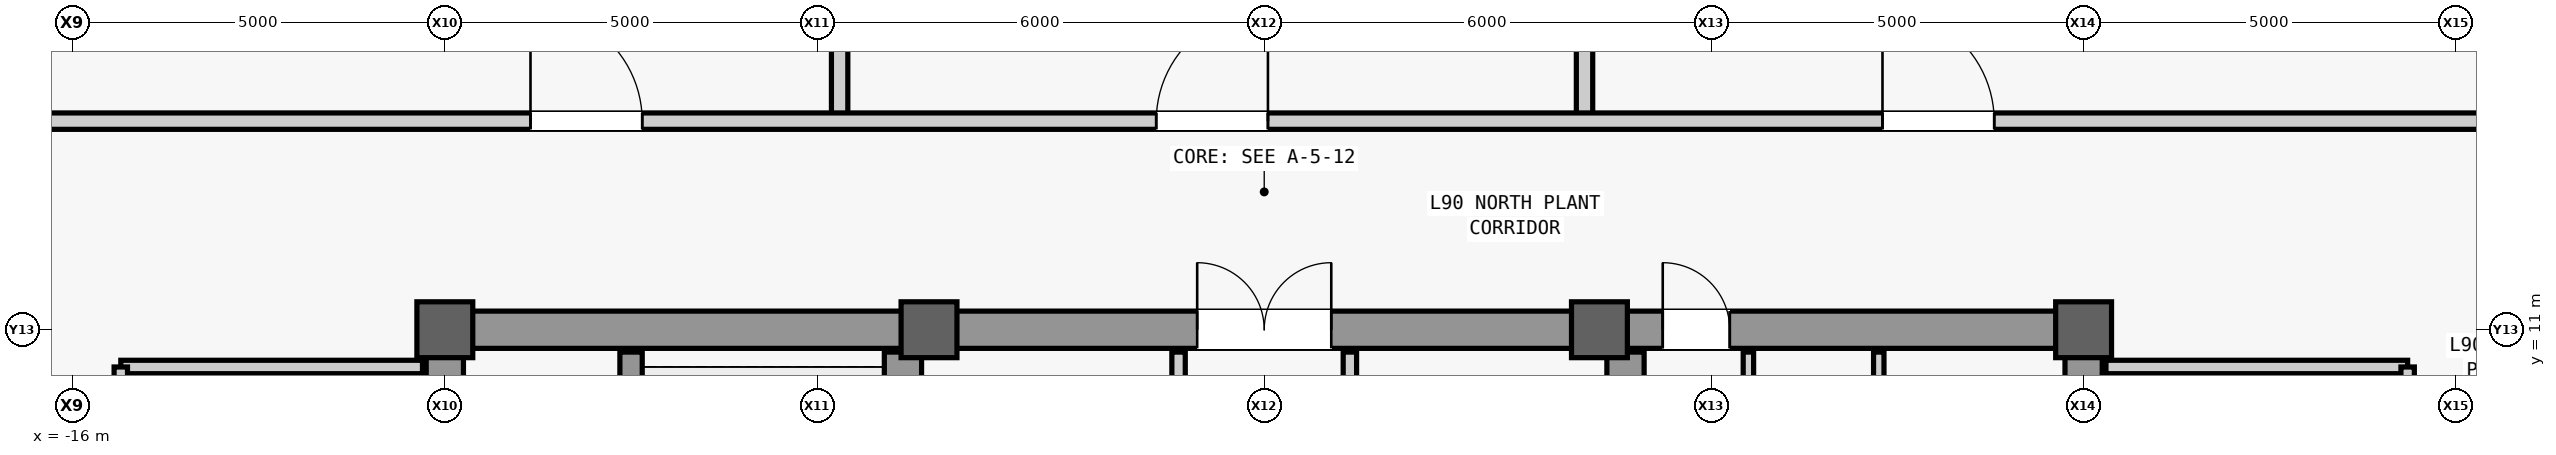
"""IFC4 building model, lengths in metres.
Left out: names, types, materials, properties, quantities, classifications, styles, units other than length and angle.
Written with IfcOpenShell. Run it as: python <this file> out.ifc"""

import sys

from ifc_helpers import new_model, si_unit, direction, frame, frame_2d, origin, origin_2d, place, context, subcontext, project, spatial, rectangle, extrude, source, transform, mapped, element, fill, save


model = new_model("IFC4")
c1 = context("Model", 3, precision=1e-05, world=origin(), true_north=direction((0.0, 1.0)))
c2 = subcontext(c1, "Body", "Model", "MODEL_VIEW")
j1 = project(units=[si_unit("LENGTHUNIT", "METRE"), si_unit("PLANEANGLEUNIT", "RADIAN")], contexts=[c1])
p1 = place(None, origin())
s1 = spatial("IfcSite", under=j1, at=p1, CompositionType="ELEMENT")
p2 = place(p1, origin())
s2 = spatial("IfcBuilding", under=s1, at=p2, CompositionType="ELEMENT")
p3 = place(p2, frame((0.0, 0.0, 380.3)))
s3 = spatial("IfcBuildingStorey", under=s2, at=p3, CompositionType="ELEMENT", Elevation=380.3)
m1 = source(origin(), c2, "Body", "SweptSolid", [
    extrude(rectangle(XDim=22.0, YDim=0.5, at=frame_2d((11.0, 0.0))), origin(), (0.0, 0.0, 1.0), 4.45),
])
p4 = place(p3, frame((-11.0, -11.0, 0.0), z_axis=(0.0, 0.0, 1.0), x_axis=(0.0, 1.0, 0.0)))
e1 = element("IfcWall", 1, at=p4, inside=s3, PredefinedType="SHEAR", context=c2, shape_type="MappedRepresentation", body=[
    mapped(m1, transform((0.0, 0.0, 0.0), scale=1.0)),
])
m2 = source(origin(), c2, "Body", "SweptSolid", [
    extrude(rectangle(XDim=1.1, YDim=2.2, at=frame_2d((0.55, 1.1))), frame((0.0, 0.26, 0.0), z_axis=(0.0, -1.0, 0.0), x_axis=(1.0, 0.0, 0.0)), (0.0, 0.0, 1.0), 0.52),
])
p5 = place(p4, frame((0.8, 0.0, 0.0)))
e2 = element("IfcOpeningElement", 2, at=p5, cuts=e1, PredefinedType="OPENING", context=c2, shape_type="MappedRepresentation", body=[
    mapped(m2, transform((0.0, 0.0, 0.0), scale=1.0)),
])
p6 = place(p4, frame((12.5, 0.0, 0.0)))
e3 = element("IfcOpeningElement", 3, at=p6, cuts=e1, PredefinedType="OPENING", context=c2, shape_type="MappedRepresentation", body=[
    mapped(m2, transform((0.0, 0.0, 0.0), scale=1.0)),
])
m3 = source(origin(), c2, "Body", "SweptSolid", [
    extrude(rectangle(XDim=0.9, YDim=2.15, at=frame_2d((0.45, 1.075))), frame((0.0, 0.26, 0.0), z_axis=(0.0, -1.0, 0.0), x_axis=(1.0, 0.0, 0.0)), (0.0, 0.0, 1.0), 0.52),
])
p7 = place(p4, frame((7.575, 0.0, 0.0)))
e4 = element("IfcOpeningElement", 4, at=p7, cuts=e1, PredefinedType="OPENING", context=c2, shape_type="MappedRepresentation", body=[
    mapped(m3, transform((0.0, 0.0, 0.0), scale=1.0)),
])
m4 = source(origin(), c2, "Body", "SweptSolid", [
    extrude(rectangle(XDim=1.3, YDim=2.3, at=frame_2d((0.65, 1.15))), frame((0.0, 0.26, 0.0), z_axis=(0.0, -1.0, 0.0), x_axis=(1.0, 0.0, 0.0)), (0.0, 0.0, 1.0), 0.52),
])
p8 = place(p4, frame((2.7, 0.0, 0.0)))
e5 = element("IfcOpeningElement", 5, at=p8, cuts=e1, PredefinedType="OPENING", context=c2, shape_type="MappedRepresentation", body=[
    mapped(m4, transform((0.0, 0.0, 0.0), scale=1.0)),
])
p9 = place(p3, frame((11.0, -11.0, 0.0), z_axis=(0.0, 0.0, 1.0), x_axis=(0.0, 1.0, 0.0)))
e6 = element("IfcWall", 6, at=p9, inside=s3, PredefinedType="SHEAR", context=c2, shape_type="MappedRepresentation", body=[
    mapped(m1, transform((0.0, 0.0, 0.0), scale=1.0)),
])
p10 = place(p9, frame((0.8, 0.0, 0.0)))
e7 = element("IfcOpeningElement", 7, at=p10, cuts=e6, PredefinedType="OPENING", context=c2, shape_type="MappedRepresentation", body=[
    mapped(m2, transform((0.0, 0.0, 0.0), scale=1.0)),
])
p11 = place(p9, frame((7.575, 0.0, 0.0)))
e8 = element("IfcOpeningElement", 8, at=p11, cuts=e6, PredefinedType="OPENING", context=c2, shape_type="MappedRepresentation", body=[
    mapped(m3, transform((0.0, 0.0, 0.0), scale=1.0)),
])
p12 = place(p9, frame((2.7, 0.0, 0.0)))
e9 = element("IfcOpeningElement", 9, at=p12, cuts=e6, PredefinedType="OPENING", context=c2, shape_type="MappedRepresentation", body=[
    mapped(m4, transform((0.0, 0.0, 0.0), scale=1.0)),
])
p13 = place(p9, frame((13.35, 0.0, 0.0)))
e10 = element("IfcOpeningElement", 10, at=p13, cuts=e6, PredefinedType="OPENING", context=c2, shape_type="MappedRepresentation", body=[
    mapped(m4, transform((0.0, 0.0, 0.0), scale=1.0)),
])
m5 = source(origin(), c2, "Body", "SweptSolid", [
    extrude(rectangle(XDim=21.4, YDim=0.5, at=frame_2d((10.7, 0.0))), origin(), (0.0, 0.0, 1.0), 4.45),
])
for number, where, z_axis, x_axis in (
    (11, (-4.85, -10.7, 0.0), (0.0, 0.0, 1.0), (0.0, 1.0, 0.0)),
    (12, (4.85, -10.7, 0.0), (0.0, 0.0, 1.0), (0.0, 1.0, 0.0)),
):
    element("IfcWall", number, at=place(p3, frame(where, z_axis=z_axis, x_axis=x_axis)), inside=s3, PredefinedType="SHEAR", context=c2, shape_type="MappedRepresentation", body=[
        mapped(m5, transform((0.0, 0.0, 0.0), scale=1.0)),
    ])
m6 = source(origin(), c2, "Body", "SweptSolid", [
    extrude(rectangle(XDim=5.9, YDim=0.5, at=frame_2d((2.95, 0.0))), origin(), (0.0, 0.0, 1.0), 4.45),
])
p14 = place(p3, frame((-10.75, 11.0, 0.0), z_axis=(0.0, 0.0, 1.0), x_axis=(1.0, 0.0, 0.0)))
e13 = element("IfcWall", 13, at=p14, inside=s3, PredefinedType="SHEAR", context=c2, shape_type="MappedRepresentation", body=[
    mapped(m6, transform((0.0, 0.0, 0.0), scale=1.0)),
])
p15 = place(p3, frame((4.85, 11.0, 0.0), z_axis=(0.0, 0.0, 1.0), x_axis=(1.0, 0.0, 0.0)))
e14 = element("IfcWall", 14, at=p15, inside=s3, PredefinedType="SHEAR", context=c2, shape_type="MappedRepresentation", body=[
    mapped(m6, transform((0.0, 0.0, 0.0), scale=1.0)),
])
p16 = place(p15, frame((0.5, 0.0, 0.0)))
e15 = element("IfcOpeningElement", 15, at=p16, cuts=e14, PredefinedType="OPENING", context=c2, shape_type="MappedRepresentation", body=[
    mapped(m3, transform((0.0, 0.0, 0.0), scale=1.0)),
])
m7 = source(origin(), c2, "Body", "SweptSolid", [
    extrude(rectangle(XDim=9.2, YDim=0.5, at=frame_2d((4.6, 0.0))), origin(), (0.0, 0.0, 1.0), 4.45),
])
p17 = place(p3, frame((-4.6, 11.0, 0.0), z_axis=(0.0, 0.0, 1.0), x_axis=(1.0, 0.0, 0.0)))
e16 = element("IfcWall", 16, at=p17, inside=s3, PredefinedType="SHEAR", context=c2, shape_type="MappedRepresentation", body=[
    mapped(m7, transform((0.0, 0.0, 0.0), scale=1.0)),
])
m8 = source(origin(), c2, "Body", "SweptSolid", [
    extrude(rectangle(XDim=1.8, YDim=2.25, at=frame_2d((0.9, 1.125))), frame((0.0, 0.26, 0.0), z_axis=(0.0, -1.0, 0.0), x_axis=(1.0, 0.0, 0.0)), (0.0, 0.0, 1.0), 0.52),
])
p18 = place(p17, frame((3.7, 0.0, 0.0)))
e17 = element("IfcOpeningElement", 17, at=p18, cuts=e16, PredefinedType="OPENING", context=c2, shape_type="MappedRepresentation", body=[
    mapped(m8, transform((0.0, 0.0, 0.0), scale=1.0)),
])
m9 = source(origin(), c2, "Body", "SweptSolid", [
    extrude(rectangle(XDim=0.75, YDim=0.75, at=origin_2d()), origin(), (0.0, 0.0, 1.0), 4.8),
])
for number, where, z_axis, x_axis in (
    (18, (-11.0, 11.0, 0.0), (0.0, 0.0, 1.0), (1.0, 0.0, 0.0)),
    (19, (-4.5, 11.0, 0.0), (0.0, 0.0, 1.0), (1.0, 0.0, 0.0)),
    (20, (4.5, 11.0, 0.0), (0.0, 0.0, 1.0), (1.0, 0.0, 0.0)),
    (21, (11.0, 11.0, 0.0), (0.0, 0.0, 1.0), (1.0, 0.0, 0.0)),
):
    element("IfcColumn", number, at=place(p3, frame(where, z_axis=z_axis, x_axis=x_axis)), inside=s3, PredefinedType="COLUMN", context=c2, shape_type="MappedRepresentation", body=[
        mapped(m9, transform((0.0, 0.0, 0.0), scale=1.0)),
    ])
m10 = source(origin(), c2, "Body", "SweptSolid", [
    extrude(rectangle(XDim=7.75, YDim=0.3, at=frame_2d((3.875, 0.0))), origin(), (0.0, 0.0, 1.0), 4.45),
])
p19 = place(p3, frame((-8.5, 2.95, 0.0), z_axis=(0.0, 0.0, 1.0), x_axis=(0.0, 1.0, 0.0)))
e22 = element("IfcWall", 22, at=p19, inside=s3, PredefinedType="SHEAR", context=c2, shape_type="MappedRepresentation", body=[
    mapped(m10, transform((0.0, 0.0, 0.0), scale=1.0)),
])
m11 = source(origin(), c2, "Body", "SweptSolid", [
    extrude(rectangle(XDim=9.4, YDim=0.14, at=frame_2d((4.7, 0.0))), origin(), (0.0, 0.0, 1.0), 4.45),
])
p20 = place(p3, frame((8.25, 1.3, 0.0), z_axis=(0.0, 0.0, 1.0), x_axis=(0.0, 1.0, 0.0)))
e23 = element("IfcWall", 23, at=p20, inside=s3, PredefinedType="PARTITIONING", context=c2, shape_type="MappedRepresentation", body=[
    mapped(m11, transform((0.0, 0.0, 0.0), scale=1.0)),
])
m12 = source(origin(), c2, "Body", "SweptSolid", [
    extrude(rectangle(XDim=5.7, YDim=0.14, at=frame_2d((2.85, 0.0))), origin(), (0.0, 0.0, 1.0), 4.45),
])
p21 = place(p3, frame((6.5, 5.0, 0.0), z_axis=(0.0, 0.0, 1.0), x_axis=(0.0, 1.0, 0.0)))
e24 = element("IfcWall", 24, at=p21, inside=s3, PredefinedType="PARTITIONING", context=c2, shape_type="MappedRepresentation", body=[
    mapped(m12, transform((0.0, 0.0, 0.0), scale=1.0)),
])
m13 = source(origin(), c2, "Body", "SweptSolid", [
    extrude(rectangle(XDim=0.9, YDim=2.15, at=frame_2d((0.45, 1.075))), frame((0.0, 0.08, 0.0), z_axis=(0.0, -1.0, 0.0), x_axis=(1.0, 0.0, 0.0)), (0.0, 0.0, 1.0), 0.16),
])
p22 = place(p21, frame((2.05, 0.0, 0.0)))
e25 = element("IfcOpeningElement", 25, at=p22, cuts=e24, PredefinedType="OPENING", context=c2, shape_type="MappedRepresentation", body=[
    mapped(m13, transform((0.0, 0.0, 0.0), scale=1.0)),
])
m14 = source(origin(), c2, "Body", "SweptSolid", [
    extrude(rectangle(XDim=4.05, YDim=0.18, at=frame_2d((2.025, 0.0))), origin(), (0.0, 0.0, 1.0), 4.45),
])
p23 = place(p3, frame((-15.35, 10.5, 0.0), z_axis=(0.0, 0.0, 1.0), x_axis=(1.0, 0.0, 0.0)))
e26 = element("IfcWall", 26, at=p23, inside=s3, PredefinedType="PARTITIONING", context=c2, shape_type="MappedRepresentation", body=[
    mapped(m14, transform((0.0, 0.0, 0.0), scale=1.0)),
])
m15 = source(origin(), c2, "Body", "SweptSolid", [
    extrude(rectangle(XDim=16.6, YDim=0.18, at=frame_2d((8.3, 0.0))), origin(), (0.0, 0.0, 1.0), 4.45),
])
p24 = place(p3, frame((-15.35, -6.1, 0.0), z_axis=(0.0, 0.0, 1.0), x_axis=(0.0, 1.0, 0.0)))
e27 = element("IfcWall", 27, at=p24, inside=s3, PredefinedType="PARTITIONING", context=c2, shape_type="MappedRepresentation", body=[
    mapped(m15, transform((0.0, 0.0, 0.0), scale=1.0)),
])
m16 = source(origin(), c2, "Body", "SweptSolid", [
    extrude(rectangle(XDim=1.8, YDim=2.25, at=frame_2d((0.9, 1.125))), frame((0.0, 0.1, 0.0), z_axis=(0.0, -1.0, 0.0), x_axis=(1.0, 0.0, 0.0)), (0.0, 0.0, 1.0), 0.2),
])
p25 = place(p24, frame((2.7, 0.0, 0.0)))
e28 = element("IfcOpeningElement", 28, at=p25, cuts=e27, PredefinedType="OPENING", context=c2, shape_type="MappedRepresentation", body=[
    mapped(m16, transform((0.0, 0.0, 0.0), scale=1.0)),
])
p26 = place(p24, frame((11.0, 0.0, 0.0)))
e29 = element("IfcOpeningElement", 29, at=p26, cuts=e27, PredefinedType="OPENING", context=c2, shape_type="MappedRepresentation", body=[
    mapped(m16, transform((0.0, 0.0, 0.0), scale=1.0)),
])
p27 = place(p3, frame((11.3, 10.5, 0.0), z_axis=(0.0, 0.0, 1.0), x_axis=(1.0, 0.0, 0.0)))
e30 = element("IfcWall", 30, at=p27, inside=s3, PredefinedType="PARTITIONING", context=c2, shape_type="MappedRepresentation", body=[
    mapped(m14, transform((0.0, 0.0, 0.0), scale=1.0)),
])
p28 = place(p3, frame((15.35, -6.1, 0.0), z_axis=(0.0, 0.0, 1.0), x_axis=(0.0, 1.0, 0.0)))
e31 = element("IfcWall", 31, at=p28, inside=s3, PredefinedType="PARTITIONING", context=c2, shape_type="MappedRepresentation", body=[
    mapped(m15, transform((0.0, 0.0, 0.0), scale=1.0)),
])
p29 = place(p28, frame((2.7, 0.0, 0.0)))
e32 = element("IfcOpeningElement", 32, at=p29, cuts=e31, PredefinedType="OPENING", context=c2, shape_type="MappedRepresentation", body=[
    mapped(m16, transform((0.0, 0.0, 0.0), scale=1.0)),
])
p30 = place(p28, frame((13.0, 0.0, 0.0)))
e33 = element("IfcOpeningElement", 33, at=p30, cuts=e31, PredefinedType="OPENING", context=c2, shape_type="MappedRepresentation", body=[
    mapped(m16, transform((0.0, 0.0, 0.0), scale=1.0)),
])
m17 = source(origin(), c2, "Body", "SweptSolid", [
    extrude(rectangle(XDim=5.4, YDim=0.18, at=frame_2d((2.7, 0.0))), origin(), (0.0, 0.0, 1.0), 4.45),
])
p31 = place(p3, frame((-1.15, 5.3, 0.0), z_axis=(0.0, 0.0, 1.0), x_axis=(0.0, 1.0, 0.0)))
e34 = element("IfcWall", 34, at=p31, inside=s3, PredefinedType="PARTITIONING", context=c2, shape_type="MappedRepresentation", body=[
    mapped(m17, transform((0.0, 0.0, 0.0), scale=1.0)),
])
m18 = source(origin(), c2, "Body", "SweptSolid", [
    extrude(rectangle(XDim=0.9, YDim=2.15, at=frame_2d((0.45, 1.075))), frame((0.0, 0.1, 0.0), z_axis=(0.0, -1.0, 0.0), x_axis=(1.0, 0.0, 0.0)), (0.0, 0.0, 1.0), 0.2),
])
p32 = place(p31, frame((0.7, 0.0, 0.0)))
e35 = element("IfcOpeningElement", 35, at=p32, cuts=e34, PredefinedType="OPENING", context=c2, shape_type="MappedRepresentation", body=[
    mapped(m18, transform((0.0, 0.0, 0.0), scale=1.0)),
])
p33 = place(p31, frame((3.4, 0.0, 0.0)))
e36 = element("IfcOpeningElement", 36, at=p33, cuts=e34, PredefinedType="OPENING", context=c2, shape_type="MappedRepresentation", body=[
    mapped(m18, transform((0.0, 0.0, 0.0), scale=1.0)),
])
p34 = place(p3, frame((1.15, 5.3, 0.0), z_axis=(0.0, 0.0, 1.0), x_axis=(0.0, 1.0, 0.0)))
e37 = element("IfcWall", 37, at=p34, inside=s3, PredefinedType="PARTITIONING", context=c2, shape_type="MappedRepresentation", body=[
    mapped(m17, transform((0.0, 0.0, 0.0), scale=1.0)),
])
p35 = place(p34, frame((0.45, 0.0, 0.0)))
e38 = element("IfcOpeningElement", 38, at=p35, cuts=e37, PredefinedType="OPENING", context=c2, shape_type="MappedRepresentation", body=[
    mapped(m18, transform((0.0, 0.0, 0.0), scale=1.0)),
])
p36 = place(p34, frame((2.25, 0.0, 0.0)))
e39 = element("IfcOpeningElement", 39, at=p36, cuts=e37, PredefinedType="OPENING", context=c2, shape_type="MappedRepresentation", body=[
    mapped(m18, transform((0.0, 0.0, 0.0), scale=1.0)),
])
p37 = place(p34, frame((4.05, 0.0, 0.0)))
e40 = element("IfcOpeningElement", 40, at=p37, cuts=e37, PredefinedType="OPENING", context=c2, shape_type="MappedRepresentation", body=[
    mapped(m18, transform((0.0, 0.0, 0.0), scale=1.0)),
])
m19 = source(origin(), c2, "Body", "SweptSolid", [
    extrude(rectangle(XDim=10.2, YDim=0.22, at=frame_2d((5.1, 0.0))), origin(), (0.0, 0.0, 1.0), 4.45),
])
for number, where, z_axis, x_axis in (
    (41, (-5.7, 13.8, 0.0), (0.0, 0.0, 1.0), (0.0, 1.0, 0.0)),
    (42, (4.3, 13.8, 0.0), (0.0, 0.0, 1.0), (0.0, 1.0, 0.0)),
):
    element("IfcWall", number, at=place(p3, frame(where, z_axis=z_axis, x_axis=x_axis)), inside=s3, PredefinedType="PARTITIONING", context=c2, shape_type="MappedRepresentation", body=[
        mapped(m19, transform((0.0, 0.0, 0.0), scale=1.0)),
    ])
m20 = source(origin(), c2, "Body", "SweptSolid", [
    extrude(rectangle(XDim=36.0, YDim=0.22, at=frame_2d((18.0, 0.0))), origin(), (0.0, 0.0, 1.0), 4.45),
])
p38 = place(p3, frame((-18.0, 13.8, 0.0), z_axis=(0.0, 0.0, 1.0), x_axis=(1.0, 0.0, 0.0)))
e43 = element("IfcWall", 43, at=p38, inside=s3, PredefinedType="PARTITIONING", context=c2, shape_type="MappedRepresentation", body=[
    mapped(m20, transform((0.0, 0.0, 0.0), scale=1.0)),
])
m21 = source(origin(), c2, "Body", "SweptSolid", [
    extrude(rectangle(XDim=1.5, YDim=2.3, at=frame_2d((0.75, 1.15))), frame((0.0, 0.12, 0.0), z_axis=(0.0, -1.0, 0.0), x_axis=(1.0, 0.0, 0.0)), (0.0, 0.0, 1.0), 0.24),
])
p39 = place(p38, frame((8.15, 0.0, 0.0)))
e44 = element("IfcOpeningElement", 44, at=p39, cuts=e43, PredefinedType="OPENING", context=c2, shape_type="MappedRepresentation", body=[
    mapped(m21, transform((0.0, 0.0, 0.0), scale=1.0)),
])
p40 = place(p38, frame((16.55, 0.0, 0.0)))
e45 = element("IfcOpeningElement", 45, at=p40, cuts=e43, PredefinedType="OPENING", context=c2, shape_type="MappedRepresentation", body=[
    mapped(m21, transform((0.0, 0.0, 0.0), scale=1.0)),
])
p41 = place(p38, frame((26.3, 0.0, 0.0)))
e46 = element("IfcOpeningElement", 46, at=p41, cuts=e43, PredefinedType="OPENING", context=c2, shape_type="MappedRepresentation", body=[
    mapped(m21, transform((0.0, 0.0, 0.0), scale=1.0)),
])
m22 = source(origin(), c2, "Body", "SweptSolid", [
    extrude(rectangle(XDim=0.9, YDim=2.15, at=frame_2d((0.45, 1.075))), frame((0.0, 0.025, 0.0), z_axis=(0.0, -1.0, 0.0), x_axis=(1.0, 0.0, 0.0)), (0.0, 0.0, 1.0), 0.05),
])
p42 = place(p16, origin())
e47 = element("IfcDoor", 47, at=p42, inside=s3, OperationType="SINGLE_SWING_LEFT", PredefinedType="DOOR", context=c2, shape_type="MappedRepresentation", body=[
    mapped(m22, transform((0.0, 0.0, 0.0), scale=1.0)),
])
fill(e15, e47)
m23 = source(origin(), c2, "Body", "SweptSolid", [
    extrude(rectangle(XDim=1.8, YDim=2.25, at=frame_2d((0.9, 1.125))), frame((0.0, 0.025, 0.0), z_axis=(0.0, -1.0, 0.0), x_axis=(1.0, 0.0, 0.0)), (0.0, 0.0, 1.0), 0.05),
])
p43 = place(p18, origin())
e48 = element("IfcDoor", 48, at=p43, inside=s3, OperationType="SINGLE_SWING_RIGHT", PredefinedType="DOOR", context=c2, shape_type="MappedRepresentation", body=[
    mapped(m23, transform((0.0, 0.0, 0.0), scale=1.0)),
])
fill(e17, e48)
m24 = source(origin(), c2, "Body", "SweptSolid", [
    extrude(rectangle(XDim=1.5, YDim=2.3, at=frame_2d((0.75, 1.15))), frame((0.0, 0.025, 0.0), z_axis=(0.0, -1.0, 0.0), x_axis=(1.0, 0.0, 0.0)), (0.0, 0.0, 1.0), 0.05),
])
p44 = place(p39, origin())
e49 = element("IfcDoor", 49, at=p44, inside=s3, OperationType="SINGLE_SWING_LEFT", PredefinedType="DOOR", context=c2, shape_type="MappedRepresentation", body=[
    mapped(m24, transform((0.0, 0.0, 0.0), scale=1.0)),
])
fill(e44, e49)
p45 = place(p40, origin())
e50 = element("IfcDoor", 50, at=p45, inside=s3, OperationType="SINGLE_SWING_RIGHT", PredefinedType="DOOR", context=c2, shape_type="MappedRepresentation", body=[
    mapped(m24, transform((0.0, 0.0, 0.0), scale=1.0)),
])
fill(e45, e50)
p46 = place(p41, origin())
e51 = element("IfcDoor", 51, at=p46, inside=s3, OperationType="SINGLE_SWING_LEFT", PredefinedType="DOOR", context=c2, shape_type="MappedRepresentation", body=[
    mapped(m24, transform((0.0, 0.0, 0.0), scale=1.0)),
])
fill(e46, e51)
save(model, sys.argv[1])
